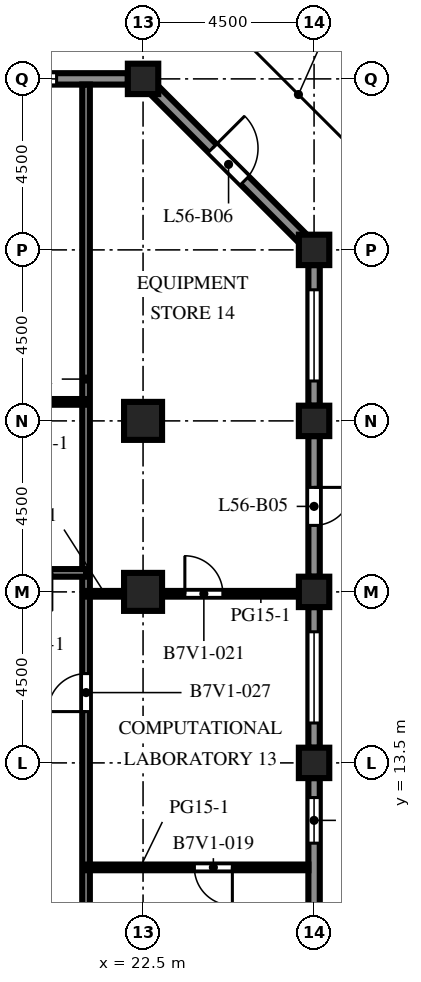
"""IFC4 building model, lengths in metres.
Left out: names, types, materials, properties, quantities, classifications, styles, units other than length and angle.
Written with IfcOpenShell. Run it as: python <this file> out.ifc"""

import sys

from ifc_helpers import new_model, si_unit, direction, frame, frame_2d, origin, origin_2d, place, context, subcontext, project, spatial, rectangle, extrude, element, fill, save


model = new_model("IFC4")
c1 = context("Model", 3, precision=1e-05, world=origin(), true_north=direction((0.0, 1.0)))
c2 = subcontext(c1, "Body", "Model", "MODEL_VIEW")
j1 = project(units=[si_unit("LENGTHUNIT", "METRE"), si_unit("PLANEANGLEUNIT", "RADIAN")], contexts=[c1])
p1 = place(None, origin())
s1 = spatial("IfcSite", under=j1, at=p1, CompositionType="ELEMENT")
p2 = place(p1, origin())
s2 = spatial("IfcBuilding", under=s1, at=p2, CompositionType="ELEMENT")
p3 = place(p2, frame((0.0, 0.0, 248.0)))
s3 = spatial("IfcBuildingStorey", under=s2, at=p3, CompositionType="ELEMENT", Elevation=248.0)
for number, where, z_axis, x_axis in (
    (1, (22.5, 31.5, 0.0), (0.0, 0.0, 1.0), (1.0, 0.0, 0.0)),
    (2, (27.0, 13.5, 0.0), (0.0, 0.0, 1.0), (1.0, 0.0, 0.0)),
    (3, (27.0, 18.0, 0.0), (0.0, 0.0, 1.0), (1.0, 0.0, 0.0)),
    (4, (27.0, 22.5, 0.0), (0.0, 0.0, 1.0), (1.0, 0.0, 0.0)),
    (5, (27.0, 27.0, 0.0), (0.0, 0.0, 1.0), (1.0, 0.0, 0.0)),
):
    element("IfcColumn", number, at=place(p3, frame(where, z_axis=z_axis, x_axis=x_axis)), inside=s3, PredefinedType="COLUMN", context=c2, shape_type="SweptSolid", body=[
        extrude(rectangle(XDim=0.8, YDim=0.8, at=origin_2d()), origin(), (0.0, 0.0, 1.0), 4.1),
    ])
for number, where, z_axis, x_axis in (
    (6, (22.5, 18.0, 0.0), (0.0, 0.0, 1.0), (1.0, 0.0, 0.0)),
    (7, (22.5, 22.5, 0.0), (0.0, 0.0, 1.0), (1.0, 0.0, 0.0)),
):
    element("IfcColumn", number, at=place(p3, frame(where, z_axis=z_axis, x_axis=x_axis)), inside=s3, PredefinedType="COLUMN", context=c2, shape_type="SweptSolid", body=[
        extrude(rectangle(XDim=1.0, YDim=1.0, at=origin_2d()), origin(), (0.0, 0.0, 1.0), 4.1),
    ])
p4 = place(p3, frame((27.0, 13.1, 0.0), z_axis=(0.0, 0.0, 1.0), x_axis=(0.0, -1.0, 0.0)))
e8 = element("IfcWall", 8, at=p4, inside=s3, PredefinedType="SOLIDWALL", context=c2, shape_type="SweptSolid", body=[
    extrude(rectangle(XDim=3.7, YDim=0.3, at=frame_2d((1.85, 0.0))), origin(), (0.0, 0.0, 1.0), 2.85),
])
p5 = place(p4, frame((0.512, 0.0, 0.8)))
e9 = element("IfcOpeningElement", 9, at=p5, cuts=e8, PredefinedType="OPENING", context=c2, shape_type="SweptSolid", body=[
    extrude(rectangle(XDim=1.2, YDim=1.7, at=frame_2d((0.6, 0.85))), frame((0.0, 0.16, 0.0), z_axis=(0.0, -1.0, 0.0), x_axis=(1.0, 0.0, 0.0)), (0.0, 0.0, 1.0), 0.32),
])
p6 = place(p3, frame((27.0, 17.6, 0.0), z_axis=(0.0, 0.0, 1.0), x_axis=(0.0, -1.0, 0.0)))
e10 = element("IfcWall", 10, at=p6, inside=s3, PredefinedType="SOLIDWALL", context=c2, shape_type="SweptSolid", body=[
    extrude(rectangle(XDim=3.7, YDim=0.3, at=frame_2d((1.85, 0.0))), origin(), (0.0, 0.0, 1.0), 2.85),
])
p7 = place(p6, frame((0.65, 0.0, 0.8)))
e11 = element("IfcOpeningElement", 11, at=p7, cuts=e10, PredefinedType="OPENING", context=c2, shape_type="SweptSolid", body=[
    extrude(rectangle(XDim=2.4, YDim=1.7, at=frame_2d((1.2, 0.85))), frame((0.0, 0.16, 0.0), z_axis=(0.0, -1.0, 0.0), x_axis=(1.0, 0.0, 0.0)), (0.0, 0.0, 1.0), 0.32),
])
p8 = place(p3, frame((27.0, 22.1, 0.0), z_axis=(0.0, 0.0, 1.0), x_axis=(0.0, -1.0, 0.0)))
e12 = element("IfcWall", 12, at=p8, inside=s3, PredefinedType="SOLIDWALL", context=c2, shape_type="SweptSolid", body=[
    extrude(rectangle(XDim=3.7, YDim=0.3, at=frame_2d((1.85, 0.0))), origin(), (0.0, 0.0, 1.0), 2.85),
])
p9 = place(p8, frame((1.35, 0.0, 0.0)))
e13 = element("IfcOpeningElement", 13, at=p9, cuts=e12, PredefinedType="OPENING", context=c2, shape_type="SweptSolid", body=[
    extrude(rectangle(XDim=1.0, YDim=2.2, at=frame_2d((0.5, 1.1))), frame((0.0, 0.16, 0.0), z_axis=(0.0, -1.0, 0.0), x_axis=(1.0, 0.0, 0.0)), (0.0, 0.0, 1.0), 0.32),
])
p10 = place(p3, frame((27.0, 26.6, 0.0), z_axis=(0.0, 0.0, 1.0), x_axis=(0.0, -1.0, 0.0)))
e14 = element("IfcWall", 14, at=p10, inside=s3, PredefinedType="SOLIDWALL", context=c2, shape_type="SweptSolid", body=[
    extrude(rectangle(XDim=3.7, YDim=0.3, at=frame_2d((1.85, 0.0))), origin(), (0.0, 0.0, 1.0), 2.85),
])
p11 = place(p10, frame((0.65, 0.0, 0.8)))
e15 = element("IfcOpeningElement", 15, at=p11, cuts=e14, PredefinedType="OPENING", context=c2, shape_type="SweptSolid", body=[
    extrude(rectangle(XDim=2.4, YDim=1.7, at=frame_2d((1.2, 0.85))), frame((0.0, 0.16, 0.0), z_axis=(0.0, -1.0, 0.0), x_axis=(1.0, 0.0, 0.0)), (0.0, 0.0, 1.0), 0.32),
])
p12 = place(p3, frame((22.794, 31.206, 0.0), z_axis=(0.0, 0.0, 1.0), x_axis=(0.707106781187, -0.707106781187, 0.0)))
e16 = element("IfcWall", 16, at=p12, inside=s3, PredefinedType="SOLIDWALL", context=c2, shape_type="SweptSolid", body=[
    extrude(rectangle(XDim=5.532, YDim=0.3, at=frame_2d((2.766, 0.0))), origin(), (0.0, 0.0, 1.0), 2.85),
])
p13 = place(p12, frame((2.166, 0.0, 0.0)))
e17 = element("IfcOpeningElement", 17, at=p13, cuts=e16, PredefinedType="OPENING", context=c2, shape_type="SweptSolid", body=[
    extrude(rectangle(XDim=1.2, YDim=2.2, at=frame_2d((0.6, 1.1))), frame((0.0, 0.16, 0.0), z_axis=(0.0, -1.0, 0.0), x_axis=(1.0, 0.0, 0.0)), (0.0, 0.0, 1.0), 0.32),
])
p14 = place(p3, frame((18.4, 31.5, 0.0), z_axis=(0.0, 0.0, 1.0), x_axis=(1.0, 0.0, 0.0)))
e18 = element("IfcWall", 18, at=p14, inside=s3, PredefinedType="SOLIDWALL", context=c2, shape_type="SweptSolid", body=[
    extrude(rectangle(XDim=3.7, YDim=0.3, at=frame_2d((1.85, 0.0))), origin(), (0.0, 0.0, 1.0), 2.85),
])
p15 = place(p14, frame((0.625, 0.0, 0.8)))
e19 = element("IfcOpeningElement", 19, at=p15, cuts=e18, PredefinedType="OPENING", context=c2, shape_type="SweptSolid", body=[
    extrude(rectangle(XDim=1.2, YDim=1.7, at=frame_2d((0.6, 0.85))), frame((0.0, 0.16, 0.0), z_axis=(0.0, -1.0, 0.0), x_axis=(1.0, 0.0, 0.0)), (0.0, 0.0, 1.0), 0.32),
])
p16 = place(p3, frame((21.0, 31.35, 0.0), z_axis=(0.0, 0.0, 1.0), x_axis=(0.0, -1.0, 0.0)))
e20 = element("IfcWall", 20, at=p16, inside=s3, PredefinedType="PARTITIONING", context=c2, shape_type="SweptSolid", body=[
    extrude(rectangle(XDim=25.1, YDim=0.2, at=frame_2d((12.55, 0.0))), origin(), (0.0, 0.0, 1.0), 3.65),
])
p17 = place(p16, frame((15.5, 0.0, 0.0)))
e21 = element("IfcOpeningElement", 21, at=p17, cuts=e20, PredefinedType="OPENING", context=c2, shape_type="SweptSolid", body=[
    extrude(rectangle(XDim=1.0, YDim=2.1, at=frame_2d((0.5, 1.05))), frame((0.0, 0.11, 0.0), z_axis=(0.0, -1.0, 0.0), x_axis=(1.0, 0.0, 0.0)), (0.0, 0.0, 1.0), 0.22),
])
p18 = place(p3, frame((26.85, 10.75, 0.0), z_axis=(0.0, 0.0, 1.0), x_axis=(-1.0, 0.0, 0.0)))
e22 = element("IfcWall", 22, at=p18, inside=s3, PredefinedType="PARTITIONING", context=c2, shape_type="SweptSolid", body=[
    extrude(rectangle(XDim=5.85, YDim=0.15, at=frame_2d((2.925, 0.0))), origin(), (0.0, 0.0, 1.0), 3.65),
])
p19 = place(p18, frame((2.0, 0.0, 0.0)))
e23 = element("IfcOpeningElement", 23, at=p19, cuts=e22, PredefinedType="OPENING", context=c2, shape_type="SweptSolid", body=[
    extrude(rectangle(XDim=1.0, YDim=2.1, at=frame_2d((0.5, 1.05))), frame((0.0, 0.085, 0.0), z_axis=(0.0, -1.0, 0.0), x_axis=(1.0, 0.0, 0.0)), (0.0, 0.0, 1.0), 0.17),
])
p20 = place(p3, frame((21.0, 17.95, 0.0), z_axis=(0.0, 0.0, 1.0), x_axis=(1.0, 0.0, 0.0)))
e24 = element("IfcWall", 24, at=p20, inside=s3, PredefinedType="PARTITIONING", context=c2, shape_type="SweptSolid", body=[
    extrude(rectangle(XDim=1.0, YDim=0.15, at=frame_2d((0.5, 0.0))), origin(), (0.0, 0.0, 1.0), 3.65),
])
p21 = place(p3, frame((23.0, 17.95, 0.0), z_axis=(0.0, 0.0, 1.0), x_axis=(1.0, 0.0, 0.0)))
e25 = element("IfcWall", 25, at=p21, inside=s3, PredefinedType="PARTITIONING", context=c2, shape_type="SweptSolid", body=[
    extrude(rectangle(XDim=3.6, YDim=0.15, at=frame_2d((1.8, 0.0))), origin(), (0.0, 0.0, 1.0), 3.65),
])
p22 = place(p21, frame((0.6, 0.0, 0.0)))
e26 = element("IfcOpeningElement", 26, at=p22, cuts=e25, PredefinedType="OPENING", context=c2, shape_type="SweptSolid", body=[
    extrude(rectangle(XDim=1.0, YDim=2.1, at=frame_2d((0.5, 1.05))), frame((0.0, 0.085, 0.0), z_axis=(0.0, -1.0, 0.0), x_axis=(1.0, 0.0, 0.0)), (0.0, 0.0, 1.0), 0.17),
])
p23 = place(p3, frame((18.0, 18.5, 0.0), z_axis=(0.0, 0.0, 1.0), x_axis=(1.0, 0.0, 0.0)))
e27 = element("IfcWall", 27, at=p23, inside=s3, PredefinedType="PARTITIONING", context=c2, shape_type="SweptSolid", body=[
    extrude(rectangle(XDim=3.0, YDim=0.2, at=frame_2d((1.5, 0.0))), origin(), (0.0, 0.0, 1.0), 3.65),
])
p24 = place(p23, frame((1.1, 0.0, 0.0)))
e28 = element("IfcOpeningElement", 28, at=p24, cuts=e27, PredefinedType="OPENING", context=c2, shape_type="SweptSolid", body=[
    extrude(rectangle(XDim=1.0, YDim=2.1, at=frame_2d((0.5, 1.05))), frame((0.0, 0.11, 0.0), z_axis=(0.0, -1.0, 0.0), x_axis=(1.0, 0.0, 0.0)), (0.0, 0.0, 1.0), 0.22),
])
p25 = place(p3, frame((18.5, 23.0, 0.0), z_axis=(0.0, 0.0, 1.0), x_axis=(1.0, 0.0, 0.0)))
e29 = element("IfcWall", 29, at=p25, inside=s3, PredefinedType="PARTITIONING", context=c2, shape_type="SweptSolid", body=[
    extrude(rectangle(XDim=2.5, YDim=0.15, at=frame_2d((1.25, 0.0))), origin(), (0.0, 0.0, 1.0), 3.65),
])
p26 = place(p5, origin())
e30 = element("IfcWindow", 30, at=p26, inside=s3, PartitioningType="SINGLE_PANEL", PredefinedType="WINDOW", context=c2, shape_type="SweptSolid", body=[
    extrude(rectangle(XDim=1.2, YDim=1.7, at=frame_2d((0.6, 0.85))), frame((0.0, 0.03, 0.0), z_axis=(0.0, -1.0, 0.0), x_axis=(1.0, 0.0, 0.0)), (0.0, 0.0, 1.0), 0.06),
])
fill(e9, e30)
p27 = place(p7, origin())
e31 = element("IfcWindow", 31, at=p27, inside=s3, PartitioningType="SINGLE_PANEL", PredefinedType="WINDOW", context=c2, shape_type="SweptSolid", body=[
    extrude(rectangle(XDim=2.4, YDim=1.7, at=frame_2d((1.2, 0.85))), frame((0.0, 0.03, 0.0), z_axis=(0.0, -1.0, 0.0), x_axis=(1.0, 0.0, 0.0)), (0.0, 0.0, 1.0), 0.06),
])
fill(e11, e31)
p28 = place(p9, origin())
e32 = element("IfcDoor", 32, at=p28, inside=s3, OperationType="SINGLE_SWING_LEFT", PredefinedType="DOOR", context=c2, shape_type="SweptSolid", body=[
    extrude(rectangle(XDim=1.0, YDim=2.2, at=frame_2d((0.5, 1.1))), frame((0.0, 0.025, 0.0), z_axis=(0.0, -1.0, 0.0), x_axis=(1.0, 0.0, 0.0)), (0.0, 0.0, 1.0), 0.05),
])
fill(e13, e32)
p29 = place(p11, origin())
e33 = element("IfcWindow", 33, at=p29, inside=s3, PartitioningType="SINGLE_PANEL", PredefinedType="WINDOW", context=c2, shape_type="SweptSolid", body=[
    extrude(rectangle(XDim=2.4, YDim=1.7, at=frame_2d((1.2, 0.85))), frame((0.0, 0.03, 0.0), z_axis=(0.0, -1.0, 0.0), x_axis=(1.0, 0.0, 0.0)), (0.0, 0.0, 1.0), 0.06),
])
fill(e15, e33)
p30 = place(p13, origin())
e34 = element("IfcDoor", 34, at=p30, inside=s3, OperationType="SINGLE_SWING_LEFT", PredefinedType="DOOR", context=c2, shape_type="SweptSolid", body=[
    extrude(rectangle(XDim=1.2, YDim=2.2, at=frame_2d((0.6, 1.1))), frame((0.0, 0.025, 0.0), z_axis=(0.0, -1.0, 0.0), x_axis=(1.0, 0.0, 0.0)), (0.0, 0.0, 1.0), 0.05),
])
fill(e17, e34)
p31 = place(p15, origin())
e35 = element("IfcWindow", 35, at=p31, inside=s3, PartitioningType="SINGLE_PANEL", PredefinedType="WINDOW", context=c2, shape_type="SweptSolid", body=[
    extrude(rectangle(XDim=1.2, YDim=1.7, at=frame_2d((0.6, 0.85))), frame((0.0, 0.03, 0.0), z_axis=(0.0, -1.0, 0.0), x_axis=(1.0, 0.0, 0.0)), (0.0, 0.0, 1.0), 0.06),
])
fill(e19, e35)
p32 = place(p19, origin())
e36 = element("IfcDoor", 36, at=p32, inside=s3, OperationType="SINGLE_SWING_LEFT", PredefinedType="DOOR", context=c2, shape_type="SweptSolid", body=[
    extrude(rectangle(XDim=1.0, YDim=2.1, at=frame_2d((0.5, 1.05))), frame((0.0, 0.025, 0.0), z_axis=(0.0, -1.0, 0.0), x_axis=(1.0, 0.0, 0.0)), (0.0, 0.0, 1.0), 0.05),
])
fill(e23, e36)
p33 = place(p22, origin())
e37 = element("IfcDoor", 37, at=p33, inside=s3, OperationType="SINGLE_SWING_LEFT", PredefinedType="DOOR", context=c2, shape_type="SweptSolid", body=[
    extrude(rectangle(XDim=1.0, YDim=2.1, at=frame_2d((0.5, 1.05))), frame((0.0, 0.025, 0.0), z_axis=(0.0, -1.0, 0.0), x_axis=(1.0, 0.0, 0.0)), (0.0, 0.0, 1.0), 0.05),
])
fill(e26, e37)
p34 = place(p17, origin())
e38 = element("IfcDoor", 38, at=p34, inside=s3, OperationType="SINGLE_SWING_RIGHT", PredefinedType="DOOR", context=c2, shape_type="SweptSolid", body=[
    extrude(rectangle(XDim=1.0, YDim=2.1, at=frame_2d((0.5, 1.05))), frame((0.0, 0.025, 0.0), z_axis=(0.0, -1.0, 0.0), x_axis=(1.0, 0.0, 0.0)), (0.0, 0.0, 1.0), 0.05),
])
fill(e21, e38)
save(model, sys.argv[1])
